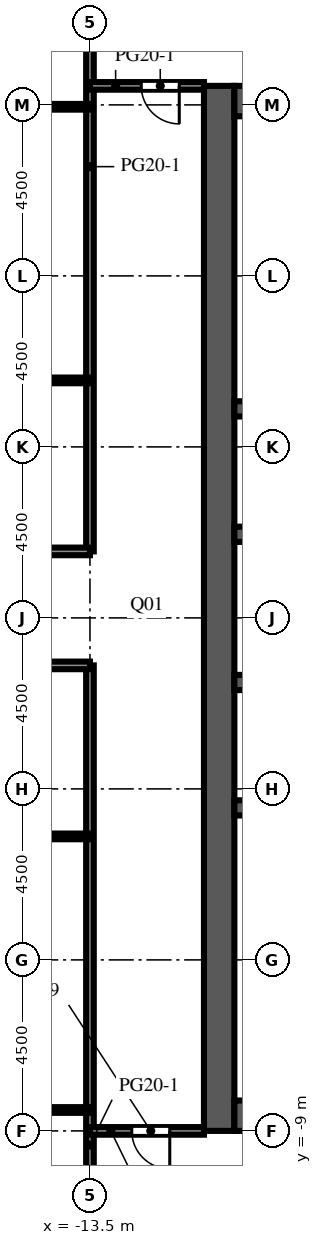
"""IFC4 building model, lengths in metres.
Left out: names, types, materials, properties, quantities, classifications, styles, units other than length and angle.
Written with IfcOpenShell. Run it as: python <this file> out.ifc"""

import sys

from ifc_helpers import new_model, si_unit, direction, frame, frame_2d, origin, place, context, subcontext, project, spatial, rectangle, extrude, element, fill, save


model = new_model("IFC4")
c1 = context("Model", 3, precision=1e-05, world=origin(), true_north=direction((0.0, 1.0)))
c2 = subcontext(c1, "Body", "Model", "MODEL_VIEW")
j1 = project(units=[si_unit("LENGTHUNIT", "METRE"), si_unit("PLANEANGLEUNIT", "RADIAN")], contexts=[c1])
p1 = place(None, origin())
s1 = spatial("IfcSite", under=j1, at=p1, CompositionType="ELEMENT")
p2 = place(p1, origin())
s2 = spatial("IfcBuilding", under=s1, at=p2, CompositionType="ELEMENT")
p3 = place(p2, frame((0.0, 0.0, 156.8)))
s3 = spatial("IfcBuildingStorey", under=s2, at=p3, CompositionType="ELEMENT", Elevation=156.8)
p4 = place(p3, frame((-10.1, -9.0, 0.0), z_axis=(0.0, 0.0, 1.0), x_axis=(0.0, 1.0, 0.0)))
e1 = element("IfcWall", 1, at=p4, inside=s3, PredefinedType="SHEAR", context=c2, shape_type="SweptSolid", body=[
    extrude(rectangle(XDim=27.5, YDim=0.8, at=frame_2d((13.75, 0.0))), origin(), (0.0, 0.0, 1.0), 4.1),
])
p5 = place(p4, frame((12.55, 0.0, 0.0)))
e2 = element("IfcOpeningElement", 2, at=p5, cuts=e1, PredefinedType="OPENING", context=c2, shape_type="SweptSolid", body=[
    extrude(rectangle(XDim=2.4, YDim=2.4, at=frame_2d((1.2, 1.2))), frame((0.0, 0.41, 0.0), z_axis=(0.0, -1.0, 0.0), x_axis=(1.0, 0.0, 0.0)), (0.0, 0.0, 1.0), 0.82),
])
p6 = place(p4, frame((6.825, 0.0, 0.0)))
e3 = element("IfcOpeningElement", 3, at=p6, cuts=e1, PredefinedType="OPENING", context=c2, shape_type="SweptSolid", body=[
    extrude(rectangle(XDim=1.2, YDim=2.1, at=frame_2d((0.6, 1.05))), frame((0.0, 0.41, 0.0), z_axis=(0.0, -1.0, 0.0), x_axis=(1.0, 0.0, 0.0)), (0.0, 0.0, 1.0), 0.82),
])
p7 = place(p4, frame((19.475, 0.0, 0.0)))
e4 = element("IfcOpeningElement", 4, at=p7, cuts=e1, PredefinedType="OPENING", context=c2, shape_type="SweptSolid", body=[
    extrude(rectangle(XDim=1.2, YDim=2.1, at=frame_2d((0.6, 1.05))), frame((0.0, 0.41, 0.0), z_axis=(0.0, -1.0, 0.0), x_axis=(1.0, 0.0, 0.0)), (0.0, 0.0, 1.0), 0.82),
])
for number, where, z_axis, x_axis in (
    (5, (-9.7, -8.6, 0.0), (0.0, 0.0, 1.0), (1.0, 0.0, 0.0)),
    (6, (-9.7, 18.1, 0.0), (0.0, 0.0, 1.0), (1.0, 0.0, 0.0)),
):
    element("IfcWall", number, at=place(p3, frame(where, z_axis=z_axis, x_axis=x_axis)), inside=s3, PredefinedType="SHEAR", context=c2, shape_type="SweptSolid", body=[
        extrude(rectangle(XDim=10.4, YDim=0.8, at=frame_2d((5.2, 0.0))), origin(), (0.0, 0.0, 1.0), 4.1),
    ])
p8 = place(p3, frame((-9.7, -0.5, 0.0), z_axis=(0.0, 0.0, 1.0), x_axis=(1.0, 0.0, 0.0)))
e7 = element("IfcWall", 7, at=p8, inside=s3, PredefinedType="SHEAR", context=c2, shape_type="SweptSolid", body=[
    extrude(rectangle(XDim=10.4, YDim=0.4, at=frame_2d((5.2, 0.0))), origin(), (0.0, 0.0, 1.0), 4.1),
])
p9 = place(p3, frame((-9.7, 2.8, 0.0), z_axis=(0.0, 0.0, 1.0), x_axis=(1.0, 0.0, 0.0)))
e8 = element("IfcWall", 8, at=p9, inside=s3, PredefinedType="SHEAR", context=c2, shape_type="SweptSolid", body=[
    extrude(rectangle(XDim=10.4, YDim=0.4, at=frame_2d((5.2, 0.0))), origin(), (0.0, 0.0, 1.0), 4.1),
])
p10 = place(p9, frame((0.738, 0.0, 0.0)))
e9 = element("IfcOpeningElement", 9, at=p10, cuts=e8, PredefinedType="OPENING", context=c2, shape_type="SweptSolid", body=[
    extrude(rectangle(XDim=1.1, YDim=2.1, at=frame_2d((0.55, 1.05))), frame((0.0, 0.21, 0.0), z_axis=(0.0, -1.0, 0.0), x_axis=(1.0, 0.0, 0.0)), (0.0, 0.0, 1.0), 0.42),
])
p11 = place(p9, frame((3.337, 0.0, 0.0)))
e10 = element("IfcOpeningElement", 10, at=p11, cuts=e8, PredefinedType="OPENING", context=c2, shape_type="SweptSolid", body=[
    extrude(rectangle(XDim=1.1, YDim=2.1, at=frame_2d((0.55, 1.05))), frame((0.0, 0.21, 0.0), z_axis=(0.0, -1.0, 0.0), x_axis=(1.0, 0.0, 0.0)), (0.0, 0.0, 1.0), 0.42),
])
p12 = place(p9, frame((6.012, 0.0, 0.0)))
e11 = element("IfcOpeningElement", 11, at=p12, cuts=e8, PredefinedType="OPENING", context=c2, shape_type="SweptSolid", body=[
    extrude(rectangle(XDim=1.0, YDim=2.1, at=frame_2d((0.5, 1.05))), frame((0.0, 0.21, 0.0), z_axis=(0.0, -1.0, 0.0), x_axis=(1.0, 0.0, 0.0)), (0.0, 0.0, 1.0), 0.42),
])
p13 = place(p9, frame((8.613, 0.0, 0.0)))
e12 = element("IfcOpeningElement", 12, at=p13, cuts=e8, PredefinedType="OPENING", context=c2, shape_type="SweptSolid", body=[
    extrude(rectangle(XDim=1.0, YDim=2.1, at=frame_2d((0.5, 1.05))), frame((0.0, 0.21, 0.0), z_axis=(0.0, -1.0, 0.0), x_axis=(1.0, 0.0, 0.0)), (0.0, 0.0, 1.0), 0.42),
])
p14 = place(p3, frame((-9.7, 6.7, 0.0), z_axis=(0.0, 0.0, 1.0), x_axis=(1.0, 0.0, 0.0)))
e13 = element("IfcWall", 13, at=p14, inside=s3, PredefinedType="SHEAR", context=c2, shape_type="SweptSolid", body=[
    extrude(rectangle(XDim=10.4, YDim=0.4, at=frame_2d((5.2, 0.0))), origin(), (0.0, 0.0, 1.0), 4.1),
])
p15 = place(p14, frame((3.337, 0.0, 0.0)))
e14 = element("IfcOpeningElement", 14, at=p15, cuts=e13, PredefinedType="OPENING", context=c2, shape_type="SweptSolid", body=[
    extrude(rectangle(XDim=1.1, YDim=2.1, at=frame_2d((0.55, 1.05))), frame((0.0, 0.21, 0.0), z_axis=(0.0, -1.0, 0.0), x_axis=(1.0, 0.0, 0.0)), (0.0, 0.0, 1.0), 0.42),
])
p16 = place(p14, frame((5.962, 0.0, 0.0)))
e15 = element("IfcOpeningElement", 15, at=p16, cuts=e13, PredefinedType="OPENING", context=c2, shape_type="SweptSolid", body=[
    extrude(rectangle(XDim=1.1, YDim=2.1, at=frame_2d((0.55, 1.05))), frame((0.0, 0.21, 0.0), z_axis=(0.0, -1.0, 0.0), x_axis=(1.0, 0.0, 0.0)), (0.0, 0.0, 1.0), 0.42),
])
p17 = place(p14, frame((8.663, 0.0, 0.0)))
e16 = element("IfcOpeningElement", 16, at=p17, cuts=e13, PredefinedType="OPENING", context=c2, shape_type="SweptSolid", body=[
    extrude(rectangle(XDim=1.1, YDim=2.1, at=frame_2d((0.55, 1.05))), frame((0.0, 0.21, 0.0), z_axis=(0.0, -1.0, 0.0), x_axis=(1.0, 0.0, 0.0)), (0.0, 0.0, 1.0), 0.42),
])
p18 = place(p14, frame((0.688, 0.0, 0.0)))
e17 = element("IfcOpeningElement", 17, at=p18, cuts=e13, PredefinedType="OPENING", context=c2, shape_type="SweptSolid", body=[
    extrude(rectangle(XDim=1.0, YDim=2.1, at=frame_2d((0.5, 1.05))), frame((0.0, 0.21, 0.0), z_axis=(0.0, -1.0, 0.0), x_axis=(1.0, 0.0, 0.0)), (0.0, 0.0, 1.0), 0.42),
])
p19 = place(p3, frame((-9.7, 10.0, 0.0), z_axis=(0.0, 0.0, 1.0), x_axis=(1.0, 0.0, 0.0)))
e18 = element("IfcWall", 18, at=p19, inside=s3, PredefinedType="SHEAR", context=c2, shape_type="SweptSolid", body=[
    extrude(rectangle(XDim=10.4, YDim=0.4, at=frame_2d((5.2, 0.0))), origin(), (0.0, 0.0, 1.0), 4.1),
])
p20 = place(p3, frame((-13.5, -22.0, 0.0), z_axis=(0.0, 0.0, 1.0), x_axis=(0.0, 1.0, 0.0)))
e19 = element("IfcWall", 19, at=p20, inside=s3, PredefinedType="PARTITIONING", context=c2, shape_type="SweptSolid", body=[
    extrude(rectangle(XDim=25.25, YDim=0.2, at=frame_2d((12.625, 0.0))), origin(), (0.0, 0.0, 1.0), 3.65),
])
p21 = place(p3, frame((-13.5, 6.25, 0.0), z_axis=(0.0, 0.0, 1.0), x_axis=(0.0, 1.0, 0.0)))
e20 = element("IfcWall", 20, at=p21, inside=s3, PredefinedType="PARTITIONING", context=c2, shape_type="SweptSolid", body=[
    extrude(rectangle(XDim=20.25, YDim=0.2, at=frame_2d((10.125, 0.0))), origin(), (0.0, 0.0, 1.0), 3.65),
])
p22 = place(p3, frame((-10.5, -9.0, 0.0), z_axis=(0.0, 0.0, 1.0), x_axis=(-1.0, 0.0, 0.0)))
e21 = element("IfcWall", 21, at=p22, inside=s3, PredefinedType="PARTITIONING", context=c2, shape_type="SweptSolid", body=[
    extrude(rectangle(XDim=3.0, YDim=0.2, at=frame_2d((1.5, 0.0))), origin(), (0.0, 0.0, 1.0), 3.65),
])
p23 = place(p22, frame((0.9, 0.0, 0.0)))
e22 = element("IfcOpeningElement", 22, at=p23, cuts=e21, PredefinedType="OPENING", context=c2, shape_type="SweptSolid", body=[
    extrude(rectangle(XDim=1.0, YDim=2.1, at=frame_2d((0.5, 1.05))), frame((0.0, 0.11, 0.0), z_axis=(0.0, -1.0, 0.0), x_axis=(1.0, 0.0, 0.0)), (0.0, 0.0, 1.0), 0.22),
])
p24 = place(p3, frame((-17.4, -8.45, 0.0), z_axis=(0.0, 0.0, 1.0), x_axis=(1.0, 0.0, 0.0)))
e23 = element("IfcWall", 23, at=p24, inside=s3, PredefinedType="PARTITIONING", context=c2, shape_type="SweptSolid", body=[
    extrude(rectangle(XDim=3.9, YDim=0.15, at=frame_2d((1.95, 0.0))), origin(), (0.0, 0.0, 1.0), 3.65),
])
p25 = place(p3, frame((-13.5, -1.25, 0.0), z_axis=(0.0, 0.0, 1.0), x_axis=(-1.0, 0.0, 0.0)))
e24 = element("IfcWall", 24, at=p25, inside=s3, PredefinedType="PARTITIONING", context=c2, shape_type="SweptSolid", body=[
    extrude(rectangle(XDim=13.35, YDim=0.15, at=frame_2d((6.675, 0.0))), origin(), (0.0, 0.0, 1.0), 3.65),
])
p26 = place(p25, frame((8.15, 0.0, 0.0)))
e25 = element("IfcOpeningElement", 25, at=p26, cuts=e24, PredefinedType="OPENING", context=c2, shape_type="SweptSolid", body=[
    extrude(rectangle(XDim=1.0, YDim=2.1, at=frame_2d((0.5, 1.05))), frame((0.0, 0.085, 0.0), z_axis=(0.0, -1.0, 0.0), x_axis=(1.0, 0.0, 0.0)), (0.0, 0.0, 1.0), 0.17),
])
p27 = place(p3, frame((-13.5, 3.25, 0.0), z_axis=(0.0, 0.0, 1.0), x_axis=(-1.0, 0.0, 0.0)))
e26 = element("IfcWall", 26, at=p27, inside=s3, PredefinedType="PARTITIONING", context=c2, shape_type="SweptSolid", body=[
    extrude(rectangle(XDim=13.35, YDim=0.2, at=frame_2d((6.675, 0.0))), origin(), (0.0, 0.0, 1.0), 3.65),
])
p28 = place(p27, frame((6.4, 0.0, 0.0)))
e27 = element("IfcOpeningElement", 27, at=p28, cuts=e26, PredefinedType="OPENING", context=c2, shape_type="SweptSolid", body=[
    extrude(rectangle(XDim=1.0, YDim=2.1, at=frame_2d((0.5, 1.05))), frame((0.0, 0.11, 0.0), z_axis=(0.0, -1.0, 0.0), x_axis=(1.0, 0.0, 0.0)), (0.0, 0.0, 1.0), 0.22),
])
p29 = place(p3, frame((-26.85, 6.25, 0.0), z_axis=(0.0, 0.0, 1.0), x_axis=(1.0, 0.0, 0.0)))
e28 = element("IfcWall", 28, at=p29, inside=s3, PredefinedType="PARTITIONING", context=c2, shape_type="SweptSolid", body=[
    extrude(rectangle(XDim=13.35, YDim=0.2, at=frame_2d((6.675, 0.0))), origin(), (0.0, 0.0, 1.0), 3.65),
])
p30 = place(p29, frame((7.2, 0.0, 0.0)))
e29 = element("IfcOpeningElement", 29, at=p30, cuts=e28, PredefinedType="OPENING", context=c2, shape_type="SweptSolid", body=[
    extrude(rectangle(XDim=1.0, YDim=2.1, at=frame_2d((0.5, 1.05))), frame((0.0, 0.11, 0.0), z_axis=(0.0, -1.0, 0.0), x_axis=(1.0, 0.0, 0.0)), (0.0, 0.0, 1.0), 0.22),
])
p31 = place(p3, frame((-26.85, 10.75, 0.0), z_axis=(0.0, 0.0, 1.0), x_axis=(1.0, 0.0, 0.0)))
e30 = element("IfcWall", 30, at=p31, inside=s3, PredefinedType="PARTITIONING", context=c2, shape_type="SweptSolid", body=[
    extrude(rectangle(XDim=13.35, YDim=0.15, at=frame_2d((6.675, 0.0))), origin(), (0.0, 0.0, 1.0), 3.65),
])
p32 = place(p31, frame((4.45, 0.0, 0.0)))
e31 = element("IfcOpeningElement", 31, at=p32, cuts=e30, PredefinedType="OPENING", context=c2, shape_type="SweptSolid", body=[
    extrude(rectangle(XDim=1.0, YDim=2.1, at=frame_2d((0.5, 1.05))), frame((0.0, 0.085, 0.0), z_axis=(0.0, -1.0, 0.0), x_axis=(1.0, 0.0, 0.0)), (0.0, 0.0, 1.0), 0.17),
])
p33 = place(p3, frame((-17.4, 17.95, 0.0), z_axis=(0.0, 0.0, 1.0), x_axis=(1.0, 0.0, 0.0)))
e32 = element("IfcWall", 32, at=p33, inside=s3, PredefinedType="PARTITIONING", context=c2, shape_type="SweptSolid", body=[
    extrude(rectangle(XDim=3.9, YDim=0.15, at=frame_2d((1.95, 0.0))), origin(), (0.0, 0.0, 1.0), 3.65),
])
p34 = place(p3, frame((-13.5, 18.5, 0.0), z_axis=(0.0, 0.0, 1.0), x_axis=(1.0, 0.0, 0.0)))
e33 = element("IfcWall", 33, at=p34, inside=s3, PredefinedType="PARTITIONING", context=c2, shape_type="SweptSolid", body=[
    extrude(rectangle(XDim=3.0, YDim=0.2, at=frame_2d((1.5, 0.0))), origin(), (0.0, 0.0, 1.0), 3.65),
])
p35 = place(p34, frame((1.35, 0.0, 0.0)))
e34 = element("IfcOpeningElement", 34, at=p35, cuts=e33, PredefinedType="OPENING", context=c2, shape_type="SweptSolid", body=[
    extrude(rectangle(XDim=1.0, YDim=2.1, at=frame_2d((0.5, 1.05))), frame((0.0, 0.11, 0.0), z_axis=(0.0, -1.0, 0.0), x_axis=(1.0, 0.0, 0.0)), (0.0, 0.0, 1.0), 0.22),
])
p36 = place(p5, origin())
e35 = element("IfcDoor", 35, at=p36, inside=s3, OperationType="DOUBLE_DOOR_DOUBLE_SWING", PredefinedType="DOOR", context=c2, shape_type="SweptSolid", body=[
    extrude(rectangle(XDim=2.4, YDim=2.4, at=frame_2d((1.2, 1.2))), frame((0.0, 0.025, 0.0), z_axis=(0.0, -1.0, 0.0), x_axis=(1.0, 0.0, 0.0)), (0.0, 0.0, 1.0), 0.05),
])
fill(e2, e35)
p37 = place(p6, origin())
e36 = element("IfcDoor", 36, at=p37, inside=s3, OperationType="SINGLE_SWING_LEFT", PredefinedType="DOOR", context=c2, shape_type="SweptSolid", body=[
    extrude(rectangle(XDim=1.2, YDim=2.1, at=frame_2d((0.6, 1.05))), frame((0.0, 0.025, 0.0), z_axis=(0.0, -1.0, 0.0), x_axis=(1.0, 0.0, 0.0)), (0.0, 0.0, 1.0), 0.05),
])
fill(e3, e36)
p38 = place(p7, origin())
e37 = element("IfcDoor", 37, at=p38, inside=s3, OperationType="SINGLE_SWING_LEFT", PredefinedType="DOOR", context=c2, shape_type="SweptSolid", body=[
    extrude(rectangle(XDim=1.2, YDim=2.1, at=frame_2d((0.6, 1.05))), frame((0.0, 0.025, 0.0), z_axis=(0.0, -1.0, 0.0), x_axis=(1.0, 0.0, 0.0)), (0.0, 0.0, 1.0), 0.05),
])
fill(e4, e37)
p39 = place(p23, origin())
e38 = element("IfcDoor", 38, at=p39, inside=s3, OperationType="SINGLE_SWING_LEFT", PredefinedType="DOOR", context=c2, shape_type="SweptSolid", body=[
    extrude(rectangle(XDim=1.0, YDim=2.1, at=frame_2d((0.5, 1.05))), frame((0.0, 0.025, 0.0), z_axis=(0.0, -1.0, 0.0), x_axis=(1.0, 0.0, 0.0)), (0.0, 0.0, 1.0), 0.05),
])
fill(e22, e38)
p40 = place(p35, origin())
e39 = element("IfcDoor", 39, at=p40, inside=s3, OperationType="SINGLE_SWING_RIGHT", PredefinedType="DOOR", context=c2, shape_type="SweptSolid", body=[
    extrude(rectangle(XDim=1.0, YDim=2.1, at=frame_2d((0.5, 1.05))), frame((0.0, 0.025, 0.0), z_axis=(0.0, -1.0, 0.0), x_axis=(1.0, 0.0, 0.0)), (0.0, 0.0, 1.0), 0.05),
])
fill(e34, e39)
save(model, sys.argv[1])
